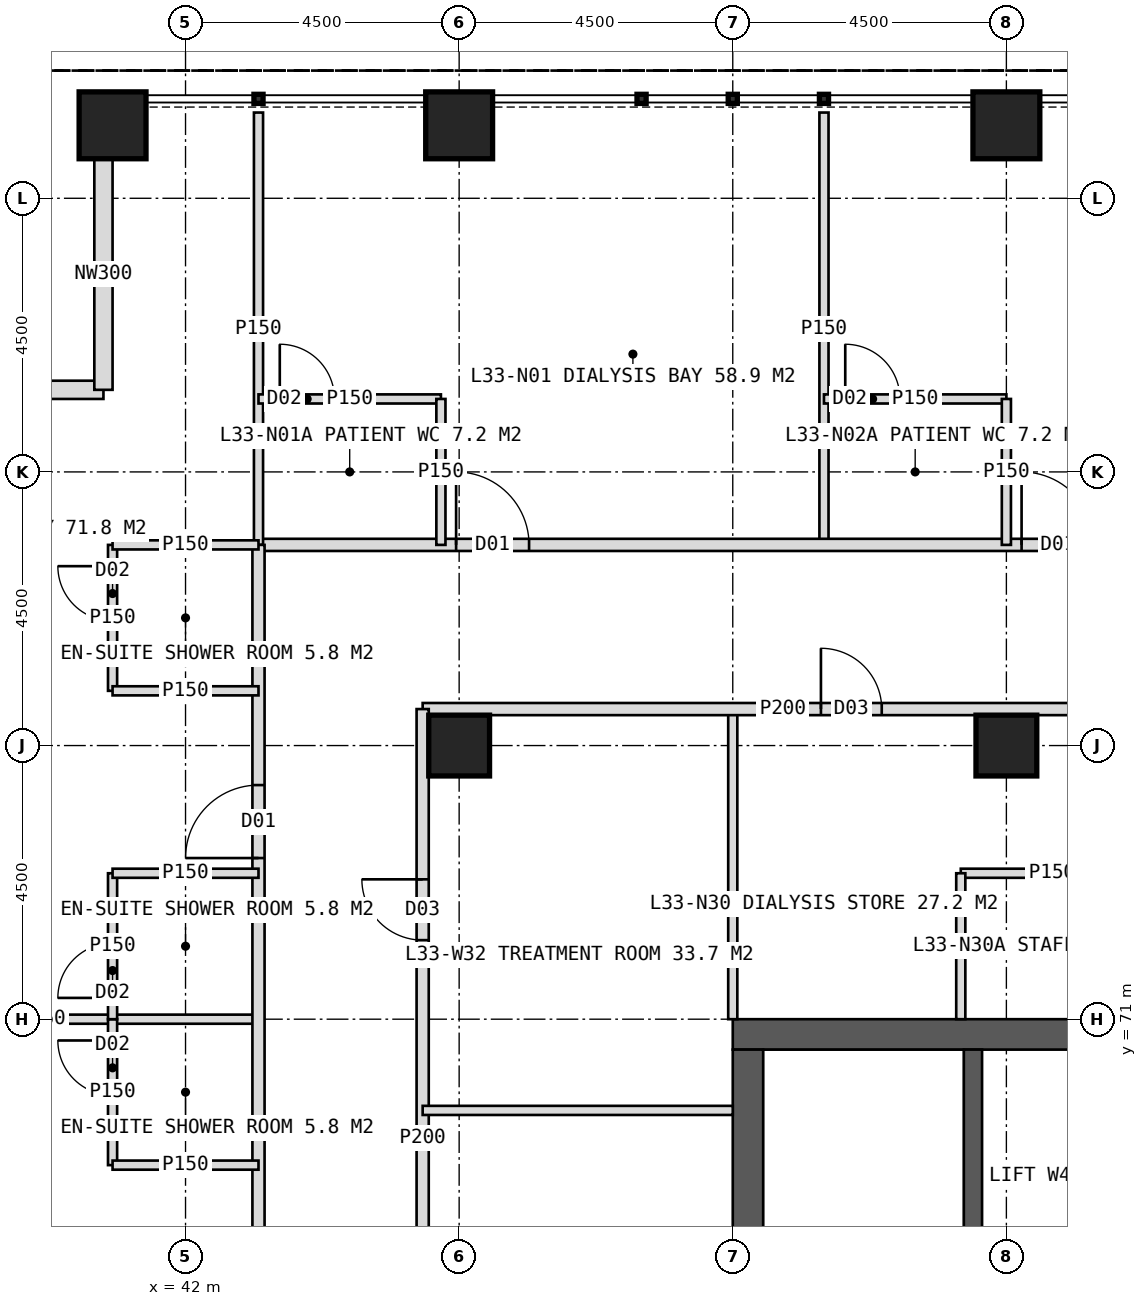
"""IFC4 building model, lengths in metres.
Left out: names, types, materials, properties, quantities, classifications, styles, units other than length and angle.
Written with IfcOpenShell. Run it as: python <this file> out.ifc"""

import sys

from ifc_helpers import new_model, si_unit, direction, frame, frame_2d, origin, origin_2d, place, context, subcontext, project, spatial, rectangle, hollow_rectangle, extrude, element, fill, save


model = new_model("IFC4")
c1 = context("Model", 3, precision=1e-05, world=origin(), true_north=direction((0.0, 1.0)))
c2 = subcontext(c1, "Body", "Model", "MODEL_VIEW")
j1 = project(units=[si_unit("LENGTHUNIT", "METRE"), si_unit("PLANEANGLEUNIT", "RADIAN")], contexts=[c1])
p1 = place(None, origin())
s1 = spatial("IfcSite", under=j1, at=p1, CompositionType="ELEMENT")
p2 = place(p1, origin())
s2 = spatial("IfcBuilding", under=s1, at=p2, CompositionType="ELEMENT")
p3 = place(p2, frame((0.0, 0.0, 140.0)))
s3 = spatial("IfcBuildingStorey", under=s2, at=p3, CompositionType="ELEMENT", Elevation=140.0)
p4 = place(p3, frame((51.0, 70.75, 0.0), z_axis=(0.0, 0.0, 1.0), x_axis=(1.0, 0.0, 0.0)))
e1 = element("IfcWall", 1, at=p4, inside=s3, PredefinedType="SHEAR", context=c2, shape_type="SweptSolid", body=[
    extrude(rectangle(XDim=18.0, YDim=0.5, at=frame_2d((9.0, 0.0))), origin(), (0.0, 0.0, 1.0), 4.0),
])
p5 = place(p4, frame((8.1, 0.0, 0.0)))
e2 = element("IfcOpeningElement", 2, at=p5, cuts=e1, PredefinedType="OPENING", context=c2, shape_type="SweptSolid", body=[
    extrude(rectangle(XDim=1.8, YDim=2.2, at=frame_2d((0.9, 1.1))), frame((0.0, 0.26, 0.0), z_axis=(0.0, -1.0, 0.0), x_axis=(1.0, 0.0, 0.0)), (0.0, 0.0, 1.0), 0.52),
])
p6 = place(p3, frame((51.25, 53.5, 0.0), z_axis=(0.0, 0.0, 1.0), x_axis=(0.0, 1.0, 0.0)))
e3 = element("IfcWall", 3, at=p6, inside=s3, PredefinedType="SHEAR", context=c2, shape_type="SweptSolid", body=[
    extrude(rectangle(XDim=17.0, YDim=0.5, at=frame_2d((8.5, 0.0))), origin(), (0.0, 0.0, 1.0), 4.0),
])
p7 = place(p6, frame((6.0, 0.0, 0.0)))
e4 = element("IfcOpeningElement", 4, at=p7, cuts=e3, PredefinedType="OPENING", context=c2, shape_type="SweptSolid", body=[
    extrude(rectangle(XDim=1.5, YDim=2.2, at=frame_2d((0.75, 1.1))), frame((0.0, 0.26, 0.0), z_axis=(0.0, -1.0, 0.0), x_axis=(1.0, 0.0, 0.0)), (0.0, 0.0, 1.0), 0.52),
])
p8 = place(p3, frame((54.95, 53.5, 0.0), z_axis=(0.0, 0.0, 1.0), x_axis=(0.0, 1.0, 0.0)))
e5 = element("IfcWall", 5, at=p8, inside=s3, PredefinedType="SHEAR", context=c2, shape_type="SweptSolid", body=[
    extrude(rectangle(XDim=17.0, YDim=0.3, at=frame_2d((8.5, 0.0))), origin(), (0.0, 0.0, 1.0), 4.0),
])
for number, where, z_axis, x_axis in (
    (6, (46.5, 75.5, 0.0), (0.0, 0.0, 1.0), (1.0, 0.0, 0.0)),
    (7, (55.5, 75.5, 0.0), (0.0, 0.0, 1.0), (1.0, 0.0, 0.0)),
):
    element("IfcColumn", number, at=place(p3, frame(where, z_axis=z_axis, x_axis=x_axis)), inside=s3, PredefinedType="COLUMN", context=c2, shape_type="SweptSolid", body=[
        extrude(hollow_rectangle(XDim=1.0, YDim=1.0, WallThickness=0.1, at=origin_2d()), origin(), (0.0, 0.0, 1.0), 4.0),
    ])
for number, where, z_axis, x_axis in (
    (8, (40.8, 85.7, 0.0), (0.0, 0.0, 1.0), (1.0, 0.0, 0.0)),
    (9, (46.5, 85.7, 0.0), (0.0, 0.0, 1.0), (1.0, 0.0, 0.0)),
    (10, (55.5, 85.7, 0.0), (0.0, 0.0, 1.0), (1.0, 0.0, 0.0)),
):
    element("IfcColumn", number, at=place(p3, frame(where, z_axis=z_axis, x_axis=x_axis)), inside=s3, PredefinedType="COLUMN", context=c2, shape_type="SweptSolid", body=[
        extrude(hollow_rectangle(XDim=1.1, YDim=1.1, WallThickness=0.1, at=origin_2d()), origin(), (0.0, 0.0, 1.0), 4.0),
    ])
for number, where, z_axis, x_axis in (
    (11, (36.85, 81.35, 0.0), (0.0, 0.0, 1.0), (1.0, 0.0, 0.0)),
    (12, (40.65, 81.35, 0.0), (0.0, 0.0, 1.0), (0.0, 1.0, 0.0)),
):
    element("IfcWall", number, at=place(p3, frame(where, z_axis=z_axis, x_axis=x_axis)), inside=s3, PredefinedType="ELEMENTEDWALL", context=c2, shape_type="SweptSolid", body=[
        extrude(rectangle(XDim=3.8, YDim=0.3, at=frame_2d((1.9, 0.0))), origin(), (0.0, 0.0, 1.0), 4.0),
    ])
p9 = place(p3, frame((52.5, 78.8, 0.0), z_axis=(0.0, 0.0, 1.0), x_axis=(0.0, 1.0, 0.0)))
e13 = element("IfcWall", 13, at=p9, inside=s3, PredefinedType="PARTITIONING", context=c2, shape_type="SweptSolid", body=[
    extrude(rectangle(XDim=7.11, YDim=0.15, at=frame_2d((3.555, 0.0))), origin(), (0.0, 0.0, 1.0), 3.75),
])
p10 = place(p3, frame((43.2, 78.8, 0.0), z_axis=(0.0, 0.0, 1.0), x_axis=(1.0, 0.0, 0.0)))
e14 = element("IfcWall", 14, at=p10, inside=s3, PredefinedType="PARTITIONING", context=c2, shape_type="SweptSolid", body=[
    extrude(rectangle(XDim=33.6, YDim=0.2, at=frame_2d((16.8, 0.0))), origin(), (0.0, 0.0, 1.0), 3.75),
])
p11 = place(p10, frame((3.25, 0.0, 0.0)))
e15 = element("IfcOpeningElement", 15, at=p11, cuts=e14, PredefinedType="OPENING", context=c2, shape_type="SweptSolid", body=[
    extrude(rectangle(XDim=1.2, YDim=2.2, at=frame_2d((0.6, 1.1))), frame((0.0, 0.11, 0.0), z_axis=(0.0, -1.0, 0.0), x_axis=(1.0, 0.0, 0.0)), (0.0, 0.0, 1.0), 0.22),
])
p12 = place(p10, frame((12.55, 0.0, 0.0)))
e16 = element("IfcOpeningElement", 16, at=p12, cuts=e14, PredefinedType="OPENING", context=c2, shape_type="SweptSolid", body=[
    extrude(rectangle(XDim=1.2, YDim=2.2, at=frame_2d((0.6, 1.1))), frame((0.0, 0.11, 0.0), z_axis=(0.0, -1.0, 0.0), x_axis=(1.0, 0.0, 0.0)), (0.0, 0.0, 1.0), 0.22),
])
p13 = place(p10, frame((26.95, 0.0, 0.0)))
e17 = element("IfcOpeningElement", 17, at=p13, cuts=e14, PredefinedType="OPENING", context=c2, shape_type="SweptSolid", body=[
    extrude(rectangle(XDim=1.2, YDim=2.2, at=frame_2d((0.6, 1.1))), frame((0.0, 0.11, 0.0), z_axis=(0.0, -1.0, 0.0), x_axis=(1.0, 0.0, 0.0)), (0.0, 0.0, 1.0), 0.22),
])
p14 = place(p3, frame((43.2, 78.8, 0.0), z_axis=(0.0, 0.0, 1.0), x_axis=(0.0, 1.0, 0.0)))
e18 = element("IfcWall", 18, at=p14, inside=s3, PredefinedType="PARTITIONING", context=c2, shape_type="SweptSolid", body=[
    extrude(rectangle(XDim=7.11, YDim=0.15, at=frame_2d((3.555, 0.0))), origin(), (0.0, 0.0, 1.0), 3.75),
])
p15 = place(p3, frame((43.2, 81.2, 0.0), z_axis=(0.0, 0.0, 1.0), x_axis=(1.0, 0.0, 0.0)))
e19 = element("IfcWall", 19, at=p15, inside=s3, PredefinedType="PARTITIONING", context=c2, shape_type="SweptSolid", body=[
    extrude(rectangle(XDim=3.0, YDim=0.15, at=frame_2d((1.5, 0.0))), origin(), (0.0, 0.0, 1.0), 2.997),
])
p16 = place(p15, frame((0.35, 0.0, 0.0)))
e20 = element("IfcOpeningElement", 20, at=p16, cuts=e19, PredefinedType="OPENING", context=c2, shape_type="SweptSolid", body=[
    extrude(rectangle(XDim=0.9, YDim=2.1, at=frame_2d((0.45, 1.05))), frame((0.0, 0.085, 0.0), z_axis=(0.0, -1.0, 0.0), x_axis=(1.0, 0.0, 0.0)), (0.0, 0.0, 1.0), 0.17),
])
p17 = place(p3, frame((46.2, 78.8, 0.0), z_axis=(0.0, 0.0, 1.0), x_axis=(0.0, 1.0, 0.0)))
e21 = element("IfcWall", 21, at=p17, inside=s3, PredefinedType="PARTITIONING", context=c2, shape_type="SweptSolid", body=[
    extrude(rectangle(XDim=2.4, YDim=0.15, at=frame_2d((1.2, 0.0))), origin(), (0.0, 0.0, 1.0), 3.75),
])
p18 = place(p3, frame((52.5, 81.2, 0.0), z_axis=(0.0, 0.0, 1.0), x_axis=(1.0, 0.0, 0.0)))
e22 = element("IfcWall", 22, at=p18, inside=s3, PredefinedType="PARTITIONING", context=c2, shape_type="SweptSolid", body=[
    extrude(rectangle(XDim=3.0, YDim=0.15, at=frame_2d((1.5, 0.0))), origin(), (0.0, 0.0, 1.0), 3.75),
])
p19 = place(p18, frame((0.35, 0.0, 0.0)))
e23 = element("IfcOpeningElement", 23, at=p19, cuts=e22, PredefinedType="OPENING", context=c2, shape_type="SweptSolid", body=[
    extrude(rectangle(XDim=0.9, YDim=2.1, at=frame_2d((0.45, 1.05))), frame((0.0, 0.085, 0.0), z_axis=(0.0, -1.0, 0.0), x_axis=(1.0, 0.0, 0.0)), (0.0, 0.0, 1.0), 0.17),
])
p20 = place(p3, frame((55.5, 78.8, 0.0), z_axis=(0.0, 0.0, 1.0), x_axis=(0.0, 1.0, 0.0)))
e24 = element("IfcWall", 24, at=p20, inside=s3, PredefinedType="PARTITIONING", context=c2, shape_type="SweptSolid", body=[
    extrude(rectangle(XDim=2.4, YDim=0.15, at=frame_2d((1.2, 0.0))), origin(), (0.0, 0.0, 1.0), 2.95),
])
p21 = place(p3, frame((51.0, 71.0, 0.0), z_axis=(0.0, 0.0, 1.0), x_axis=(0.0, 1.0, 0.0)))
e25 = element("IfcWall", 25, at=p21, inside=s3, PredefinedType="PARTITIONING", context=c2, shape_type="SweptSolid", body=[
    extrude(rectangle(XDim=5.1, YDim=0.15, at=frame_2d((2.55, 0.0))), origin(), (0.0, 0.0, 1.0), 3.75),
])
p22 = place(p3, frame((45.9, 76.1, 0.0), z_axis=(0.0, 0.0, 1.0), x_axis=(1.0, 0.0, 0.0)))
e26 = element("IfcWall", 26, at=p22, inside=s3, PredefinedType="PARTITIONING", context=c2, shape_type="SweptSolid", body=[
    extrude(rectangle(XDim=11.85, YDim=0.2, at=frame_2d((5.925, 0.0))), origin(), (0.0, 0.0, 1.0), 3.75),
])
p23 = place(p22, frame((6.55, 0.0, 0.0)))
e27 = element("IfcOpeningElement", 27, at=p23, cuts=e26, PredefinedType="OPENING", context=c2, shape_type="SweptSolid", body=[
    extrude(rectangle(XDim=1.0, YDim=2.1, at=frame_2d((0.5, 1.05))), frame((0.0, 0.11, 0.0), z_axis=(0.0, -1.0, 0.0), x_axis=(1.0, 0.0, 0.0)), (0.0, 0.0, 1.0), 0.22),
])
p24 = place(p3, frame((54.75, 73.4, 0.0), z_axis=(0.0, 0.0, 1.0), x_axis=(1.0, 0.0, 0.0)))
e28 = element("IfcWall", 28, at=p24, inside=s3, PredefinedType="PARTITIONING", context=c2, shape_type="SweptSolid", body=[
    extrude(rectangle(XDim=3.0, YDim=0.15, at=frame_2d((1.5, 0.0))), origin(), (0.0, 0.0, 1.0), 3.75),
])
p25 = place(p3, frame((54.75, 71.0, 0.0), z_axis=(0.0, 0.0, 1.0), x_axis=(0.0, 1.0, 0.0)))
e29 = element("IfcWall", 29, at=p25, inside=s3, PredefinedType="PARTITIONING", context=c2, shape_type="SweptSolid", body=[
    extrude(rectangle(XDim=2.4, YDim=0.15, at=frame_2d((1.2, 0.0))), origin(), (0.0, 0.0, 1.0), 3.75),
])
p26 = place(p3, frame((43.2, 71.0, 0.0), z_axis=(0.0, 0.0, 1.0), x_axis=(-1.0, 0.0, 0.0)))
e30 = element("IfcWall", 30, at=p26, inside=s3, PredefinedType="PARTITIONING", context=c2, shape_type="SweptSolid", body=[
    extrude(rectangle(XDim=7.11, YDim=0.15, at=frame_2d((3.555, 0.0))), origin(), (0.0, 0.0, 1.0), 3.75),
])
p27 = place(p3, frame((43.2, 45.2, 0.0), z_axis=(0.0, 0.0, 1.0), x_axis=(0.0, 1.0, 0.0)))
e31 = element("IfcWall", 31, at=p27, inside=s3, PredefinedType="PARTITIONING", context=c2, shape_type="SweptSolid", body=[
    extrude(rectangle(XDim=33.6, YDim=0.2, at=frame_2d((16.8, 0.0))), origin(), (0.0, 0.0, 1.0), 3.75),
])
p28 = place(p27, frame((2.65, 0.0, 0.0)))
e32 = element("IfcOpeningElement", 32, at=p28, cuts=e31, PredefinedType="OPENING", context=c2, shape_type="SweptSolid", body=[
    extrude(rectangle(XDim=1.2, YDim=2.2, at=frame_2d((0.6, 1.1))), frame((0.0, 0.11, 0.0), z_axis=(0.0, -1.0, 0.0), x_axis=(1.0, 0.0, 0.0)), (0.0, 0.0, 1.0), 0.22),
])
p29 = place(p27, frame((8.95, 0.0, 0.0)))
e33 = element("IfcOpeningElement", 33, at=p29, cuts=e31, PredefinedType="OPENING", context=c2, shape_type="SweptSolid", body=[
    extrude(rectangle(XDim=1.2, YDim=2.2, at=frame_2d((0.6, 1.1))), frame((0.0, 0.11, 0.0), z_axis=(0.0, -1.0, 0.0), x_axis=(1.0, 0.0, 0.0)), (0.0, 0.0, 1.0), 0.22),
])
p30 = place(p27, frame((19.45, 0.0, 0.0)))
e34 = element("IfcOpeningElement", 34, at=p30, cuts=e31, PredefinedType="OPENING", context=c2, shape_type="SweptSolid", body=[
    extrude(rectangle(XDim=1.2, YDim=2.2, at=frame_2d((0.6, 1.1))), frame((0.0, 0.11, 0.0), z_axis=(0.0, -1.0, 0.0), x_axis=(1.0, 0.0, 0.0)), (0.0, 0.0, 1.0), 0.22),
])
p31 = place(p27, frame((28.45, 0.0, 0.0)))
e35 = element("IfcOpeningElement", 35, at=p31, cuts=e31, PredefinedType="OPENING", context=c2, shape_type="SweptSolid", body=[
    extrude(rectangle(XDim=1.2, YDim=2.2, at=frame_2d((0.6, 1.1))), frame((0.0, 0.11, 0.0), z_axis=(0.0, -1.0, 0.0), x_axis=(1.0, 0.0, 0.0)), (0.0, 0.0, 1.0), 0.22),
])
p32 = place(p3, frame((40.8, 68.6, 0.0), z_axis=(0.0, 0.0, 1.0), x_axis=(0.0, 1.0, 0.0)))
e36 = element("IfcWall", 36, at=p32, inside=s3, PredefinedType="PARTITIONING", context=c2, shape_type="SweptSolid", body=[
    extrude(rectangle(XDim=2.4, YDim=0.15, at=frame_2d((1.2, 0.0))), origin(), (0.0, 0.0, 1.0), 3.75),
])
p33 = place(p32, frame((1.15, 0.0, 0.0)))
e37 = element("IfcOpeningElement", 37, at=p33, cuts=e36, PredefinedType="OPENING", context=c2, shape_type="SweptSolid", body=[
    extrude(rectangle(XDim=0.9, YDim=2.1, at=frame_2d((0.45, 1.05))), frame((0.0, 0.085, 0.0), z_axis=(0.0, -1.0, 0.0), x_axis=(1.0, 0.0, 0.0)), (0.0, 0.0, 1.0), 0.17),
])
p34 = place(p3, frame((43.2, 68.6, 0.0), z_axis=(0.0, 0.0, 1.0), x_axis=(-1.0, 0.0, 0.0)))
e38 = element("IfcWall", 38, at=p34, inside=s3, PredefinedType="PARTITIONING", context=c2, shape_type="SweptSolid", body=[
    extrude(rectangle(XDim=2.4, YDim=0.15, at=frame_2d((1.2, 0.0))), origin(), (0.0, 0.0, 1.0), 3.75),
])
p35 = place(p3, frame((40.8, 71.0, 0.0), z_axis=(0.0, 0.0, 1.0), x_axis=(0.0, 1.0, 0.0)))
e39 = element("IfcWall", 39, at=p35, inside=s3, PredefinedType="PARTITIONING", context=c2, shape_type="SweptSolid", body=[
    extrude(rectangle(XDim=2.4, YDim=0.15, at=frame_2d((1.2, 0.0))), origin(), (0.0, 0.0, 1.0), 3.75),
])
p36 = place(p35, frame((0.35, 0.0, 0.0)))
e40 = element("IfcOpeningElement", 40, at=p36, cuts=e39, PredefinedType="OPENING", context=c2, shape_type="SweptSolid", body=[
    extrude(rectangle(XDim=0.9, YDim=2.1, at=frame_2d((0.45, 1.05))), frame((0.0, 0.085, 0.0), z_axis=(0.0, -1.0, 0.0), x_axis=(1.0, 0.0, 0.0)), (0.0, 0.0, 1.0), 0.17),
])
p37 = place(p3, frame((43.2, 73.4, 0.0), z_axis=(0.0, 0.0, 1.0), x_axis=(-1.0, 0.0, 0.0)))
e41 = element("IfcWall", 41, at=p37, inside=s3, PredefinedType="PARTITIONING", context=c2, shape_type="SweptSolid", body=[
    extrude(rectangle(XDim=2.4, YDim=0.15, at=frame_2d((1.2, 0.0))), origin(), (0.0, 0.0, 1.0), 3.75),
])
p38 = place(p3, frame((40.8, 76.4, 0.0), z_axis=(0.0, 0.0, 1.0), x_axis=(0.0, 1.0, 0.0)))
e42 = element("IfcWall", 42, at=p38, inside=s3, PredefinedType="PARTITIONING", context=c2, shape_type="SweptSolid", body=[
    extrude(rectangle(XDim=2.4, YDim=0.15, at=frame_2d((1.2, 0.0))), origin(), (0.0, 0.0, 1.0), 2.997),
])
p39 = place(p38, frame((1.15, 0.0, 0.0)))
e43 = element("IfcOpeningElement", 43, at=p39, cuts=e42, PredefinedType="OPENING", context=c2, shape_type="SweptSolid", body=[
    extrude(rectangle(XDim=0.9, YDim=2.1, at=frame_2d((0.45, 1.05))), frame((0.0, 0.085, 0.0), z_axis=(0.0, -1.0, 0.0), x_axis=(1.0, 0.0, 0.0)), (0.0, 0.0, 1.0), 0.17),
])
for number, where, z_axis, x_axis in (
    (44, (43.2, 76.4, 0.0), (0.0, 0.0, 1.0), (-1.0, 0.0, 0.0)),
    (45, (43.2, 78.8, 0.0), (0.0, 0.0, 1.0), (-1.0, 0.0, 0.0)),
):
    element("IfcWall", number, at=place(p3, frame(where, z_axis=z_axis, x_axis=x_axis)), inside=s3, PredefinedType="PARTITIONING", context=c2, shape_type="SweptSolid", body=[
        extrude(rectangle(XDim=2.4, YDim=0.15, at=frame_2d((1.2, 0.0))), origin(), (0.0, 0.0, 1.0), 3.75),
    ])
p40 = place(p3, frame((45.9, 62.0, 0.0), z_axis=(0.0, 0.0, 1.0), x_axis=(0.0, 1.0, 0.0)))
e46 = element("IfcWall", 46, at=p40, inside=s3, PredefinedType="PARTITIONING", context=c2, shape_type="SweptSolid", body=[
    extrude(rectangle(XDim=14.1, YDim=0.2, at=frame_2d((7.05, 0.0))), origin(), (0.0, 0.0, 1.0), 3.75),
])
p41 = place(p40, frame((1.45, 0.0, 0.0)))
e47 = element("IfcOpeningElement", 47, at=p41, cuts=e46, PredefinedType="OPENING", context=c2, shape_type="SweptSolid", body=[
    extrude(rectangle(XDim=1.0, YDim=2.1, at=frame_2d((0.5, 1.05))), frame((0.0, 0.11, 0.0), z_axis=(0.0, -1.0, 0.0), x_axis=(1.0, 0.0, 0.0)), (0.0, 0.0, 1.0), 0.22),
])
p42 = place(p40, frame((10.3, 0.0, 0.0)))
e48 = element("IfcOpeningElement", 48, at=p42, cuts=e46, PredefinedType="OPENING", context=c2, shape_type="SweptSolid", body=[
    extrude(rectangle(XDim=1.0, YDim=2.1, at=frame_2d((0.5, 1.05))), frame((0.0, 0.11, 0.0), z_axis=(0.0, -1.0, 0.0), x_axis=(1.0, 0.0, 0.0)), (0.0, 0.0, 1.0), 0.22),
])
p43 = place(p3, frame((51.0, 69.5, 0.0), z_axis=(0.0, 0.0, 1.0), x_axis=(-1.0, 0.0, 0.0)))
e49 = element("IfcWall", 49, at=p43, inside=s3, PredefinedType="PARTITIONING", context=c2, shape_type="SweptSolid", body=[
    extrude(rectangle(XDim=5.1, YDim=0.15, at=frame_2d((2.55, 0.0))), origin(), (0.0, 0.0, 1.0), 3.75),
])
p44 = place(p11, origin())
e50 = element("IfcDoor", 50, at=p44, inside=s3, OperationType="SINGLE_SWING_LEFT", PredefinedType="DOOR", context=c2, shape_type="SweptSolid", body=[
    extrude(rectangle(XDim=1.2, YDim=2.2, at=frame_2d((0.6, 1.1))), frame((0.0, 0.025, 0.0), z_axis=(0.0, -1.0, 0.0), x_axis=(1.0, 0.0, 0.0)), (0.0, 0.0, 1.0), 0.05),
])
fill(e15, e50)
p45 = place(p16, origin())
e51 = element("IfcDoor", 51, at=p45, inside=s3, OperationType="SINGLE_SWING_LEFT", PredefinedType="DOOR", context=c2, shape_type="SweptSolid", body=[
    extrude(rectangle(XDim=0.9, YDim=2.1, at=frame_2d((0.45, 1.05))), frame((0.0, 0.025, 0.0), z_axis=(0.0, -1.0, 0.0), x_axis=(1.0, 0.0, 0.0)), (0.0, 0.0, 1.0), 0.05),
])
fill(e20, e51)
p46 = place(p12, origin())
e52 = element("IfcDoor", 52, at=p46, inside=s3, OperationType="SINGLE_SWING_LEFT", PredefinedType="DOOR", context=c2, shape_type="SweptSolid", body=[
    extrude(rectangle(XDim=1.2, YDim=2.2, at=frame_2d((0.6, 1.1))), frame((0.0, 0.025, 0.0), z_axis=(0.0, -1.0, 0.0), x_axis=(1.0, 0.0, 0.0)), (0.0, 0.0, 1.0), 0.05),
])
fill(e16, e52)
p47 = place(p19, origin())
e53 = element("IfcDoor", 53, at=p47, inside=s3, OperationType="SINGLE_SWING_LEFT", PredefinedType="DOOR", context=c2, shape_type="SweptSolid", body=[
    extrude(rectangle(XDim=0.9, YDim=2.1, at=frame_2d((0.45, 1.05))), frame((0.0, 0.025, 0.0), z_axis=(0.0, -1.0, 0.0), x_axis=(1.0, 0.0, 0.0)), (0.0, 0.0, 1.0), 0.05),
])
fill(e23, e53)
p48 = place(p23, origin())
e54 = element("IfcDoor", 54, at=p48, inside=s3, OperationType="SINGLE_SWING_LEFT", PredefinedType="DOOR", context=c2, shape_type="SweptSolid", body=[
    extrude(rectangle(XDim=1.0, YDim=2.1, at=frame_2d((0.5, 1.05))), frame((0.0, 0.025, 0.0), z_axis=(0.0, -1.0, 0.0), x_axis=(1.0, 0.0, 0.0)), (0.0, 0.0, 1.0), 0.05),
])
fill(e27, e54)
p49 = place(p33, origin())
e55 = element("IfcDoor", 55, at=p49, inside=s3, OperationType="SINGLE_SWING_RIGHT", PredefinedType="DOOR", context=c2, shape_type="SweptSolid", body=[
    extrude(rectangle(XDim=0.9, YDim=2.1, at=frame_2d((0.45, 1.05))), frame((0.0, 0.025, 0.0), z_axis=(0.0, -1.0, 0.0), x_axis=(1.0, 0.0, 0.0)), (0.0, 0.0, 1.0), 0.05),
])
fill(e37, e55)
p50 = place(p31, origin())
e56 = element("IfcDoor", 56, at=p50, inside=s3, OperationType="SINGLE_SWING_LEFT", PredefinedType="DOOR", context=c2, shape_type="SweptSolid", body=[
    extrude(rectangle(XDim=1.2, YDim=2.2, at=frame_2d((0.6, 1.1))), frame((0.0, 0.025, 0.0), z_axis=(0.0, -1.0, 0.0), x_axis=(1.0, 0.0, 0.0)), (0.0, 0.0, 1.0), 0.05),
])
fill(e35, e56)
p51 = place(p36, origin())
e57 = element("IfcDoor", 57, at=p51, inside=s3, OperationType="SINGLE_SWING_LEFT", PredefinedType="DOOR", context=c2, shape_type="SweptSolid", body=[
    extrude(rectangle(XDim=0.9, YDim=2.1, at=frame_2d((0.45, 1.05))), frame((0.0, 0.025, 0.0), z_axis=(0.0, -1.0, 0.0), x_axis=(1.0, 0.0, 0.0)), (0.0, 0.0, 1.0), 0.05),
])
fill(e40, e57)
p52 = place(p39, origin())
e58 = element("IfcDoor", 58, at=p52, inside=s3, OperationType="SINGLE_SWING_RIGHT", PredefinedType="DOOR", context=c2, shape_type="SweptSolid", body=[
    extrude(rectangle(XDim=0.9, YDim=2.1, at=frame_2d((0.45, 1.05))), frame((0.0, 0.025, 0.0), z_axis=(0.0, -1.0, 0.0), x_axis=(1.0, 0.0, 0.0)), (0.0, 0.0, 1.0), 0.05),
])
fill(e43, e58)
p53 = place(p42, origin())
e59 = element("IfcDoor", 59, at=p53, inside=s3, OperationType="SINGLE_SWING_RIGHT", PredefinedType="DOOR", context=c2, shape_type="SweptSolid", body=[
    extrude(rectangle(XDim=1.0, YDim=2.1, at=frame_2d((0.5, 1.05))), frame((0.0, 0.025, 0.0), z_axis=(0.0, -1.0, 0.0), x_axis=(1.0, 0.0, 0.0)), (0.0, 0.0, 1.0), 0.05),
])
fill(e48, e59)
save(model, sys.argv[1])
